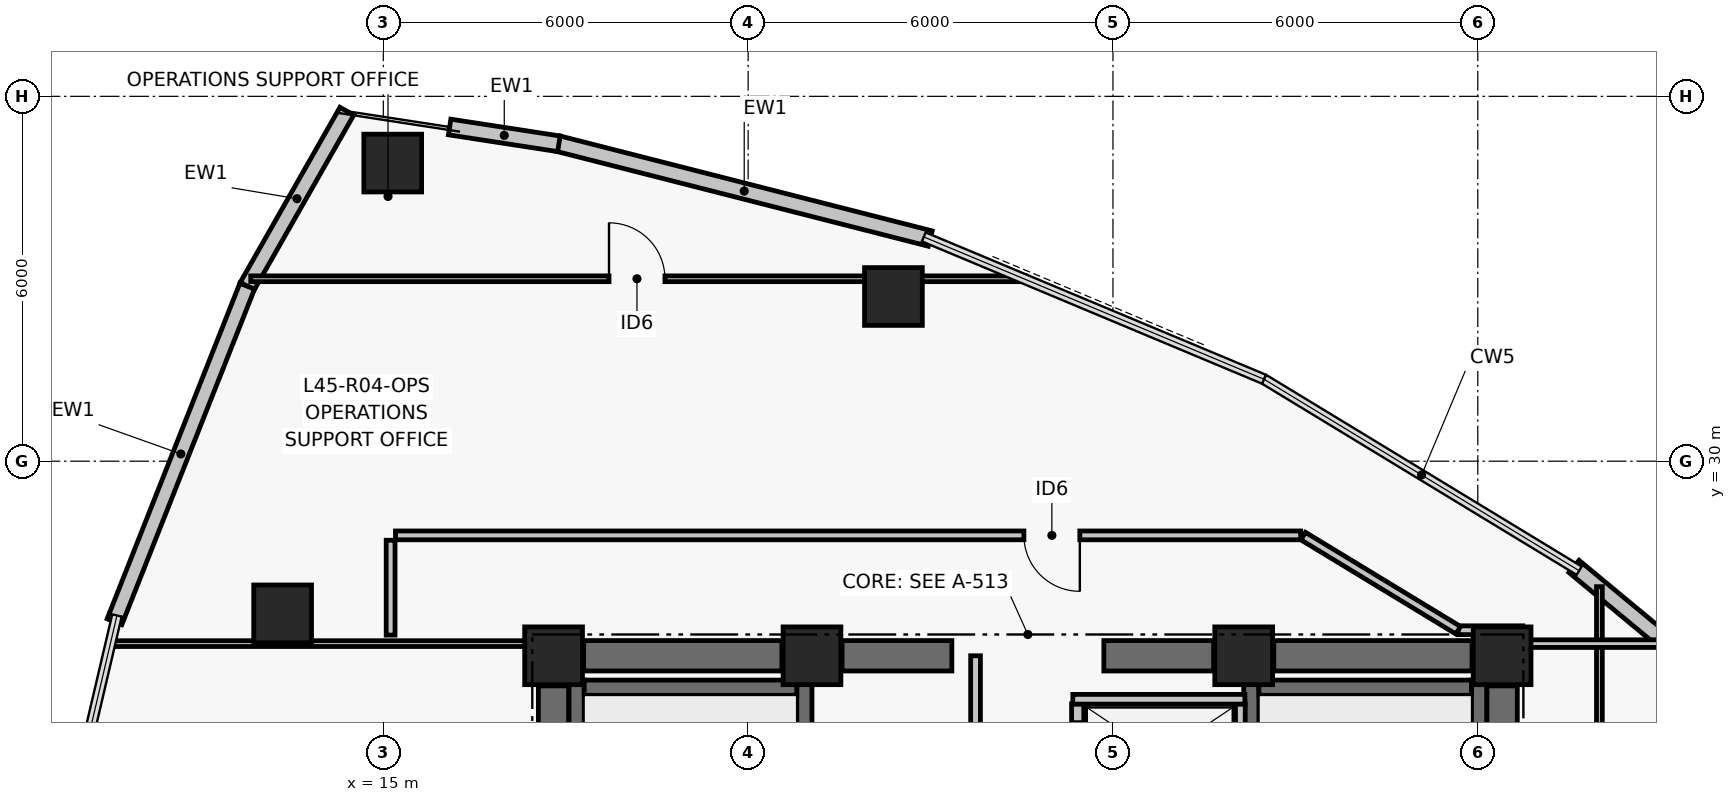
"""IFC4 building model, lengths in metres.
Left out: names, types, materials, properties, quantities, classifications, styles, units other than length and angle.
Written with IfcOpenShell. Run it as: python <this file> out.ifc"""

import sys

from ifc_helpers import new_model, si_unit, direction, frame, frame_2d, origin, origin_2d, place, context, subcontext, project, spatial, rectangle, hollow_rectangle, extrude, element, fill, save


model = new_model("IFC4")
c1 = context("Model", 3, precision=1e-05, world=origin(), true_north=direction((0.0, 1.0)))
c2 = subcontext(c1, "Body", "Model", "MODEL_VIEW")
j1 = project(units=[si_unit("LENGTHUNIT", "METRE"), si_unit("PLANEANGLEUNIT", "RADIAN")], contexts=[c1])
p1 = place(None, origin())
s1 = spatial("IfcSite", under=j1, at=p1, CompositionType="ELEMENT")
p2 = place(p1, origin())
s2 = spatial("IfcBuilding", under=s1, at=p2, CompositionType="ELEMENT")
p3 = place(p2, frame((0.0, 0.0, 180.36)))
s3 = spatial("IfcBuildingStorey", under=s2, at=p3, CompositionType="ELEMENT", Elevation=180.36)
for number, where, z_axis, x_axis in (
    (1, (17.8, 26.8, 0.0), (0.0, 0.0, 1.0), (1.0, 0.0, 0.0)),
    (2, (22.05, 26.8, 0.0), (0.0, 0.0, 1.0), (1.0, 0.0, 0.0)),
    (3, (29.15, 26.8, 0.0), (0.0, 0.0, 1.0), (1.0, 0.0, 0.0)),
    (4, (33.4, 26.8, 0.0), (0.0, 0.0, 1.0), (1.0, 0.0, 0.0)),
):
    element("IfcColumn", number, at=place(p3, frame(where, z_axis=z_axis, x_axis=x_axis)), inside=s3, PredefinedType="COLUMN", context=c2, shape_type="SweptSolid", body=[
        extrude(rectangle(XDim=0.95, YDim=0.95, at=origin_2d()), origin(), (0.0, 0.0, 1.0), 3.72),
    ])
p4 = place(p3, frame((18.295, 26.8, 0.0), z_axis=(0.0, 0.0, 1.0), x_axis=(1.0, 0.0, 0.0)))
e5 = element("IfcWall", 5, at=p4, inside=s3, PredefinedType="SHEAR", context=c2, shape_type="SweptSolid", body=[
    extrude(rectangle(XDim=3.26, YDim=0.5, at=frame_2d((1.63, 0.0))), origin(), (0.0, 0.0, 1.0), 3.5),
])
p5 = place(p3, frame((22.545, 26.8, 0.0), z_axis=(0.0, 0.0, 1.0), x_axis=(1.0, 0.0, 0.0)))
e6 = element("IfcWall", 6, at=p5, inside=s3, PredefinedType="SHEAR", context=c2, shape_type="SweptSolid", body=[
    extrude(rectangle(XDim=1.805, YDim=0.5, at=frame_2d((0.903, 0.0))), origin(), (0.0, 0.0, 1.0), 3.5),
])
p6 = place(p3, frame((26.85, 26.8, 0.0), z_axis=(0.0, 0.0, 1.0), x_axis=(1.0, 0.0, 0.0)))
e7 = element("IfcWall", 7, at=p6, inside=s3, PredefinedType="SHEAR", context=c2, shape_type="SweptSolid", body=[
    extrude(rectangle(XDim=1.805, YDim=0.5, at=frame_2d((0.902, 0.0))), origin(), (0.0, 0.0, 1.0), 3.5),
])
p7 = place(p3, frame((29.645, 26.8, 0.0), z_axis=(0.0, 0.0, 1.0), x_axis=(1.0, 0.0, 0.0)))
e8 = element("IfcWall", 8, at=p7, inside=s3, PredefinedType="SHEAR", context=c2, shape_type="SweptSolid", body=[
    extrude(rectangle(XDim=3.26, YDim=0.5, at=frame_2d((1.63, 0.0))), origin(), (0.0, 0.0, 1.0), 3.5),
])
for number, where, z_axis, x_axis in (
    (9, (17.8, 17.695, 0.0), (0.0, 0.0, 1.0), (0.0, 1.0, 0.0)),
    (10, (33.4, 17.695, 0.0), (0.0, 0.0, 1.0), (0.0, 1.0, 0.0)),
):
    element("IfcWall", number, at=place(p3, frame(where, z_axis=z_axis, x_axis=x_axis)), inside=s3, PredefinedType="SHEAR", context=c2, shape_type="SweptSolid", body=[
        extrude(rectangle(XDim=8.61, YDim=0.5, at=frame_2d((4.305, 0.0))), origin(), (0.0, 0.0, 1.0), 3.5),
    ])
p8 = place(p3, frame((18.179, 17.6, 0.0), z_axis=(0.0, 0.0, 1.0), x_axis=(0.0, 1.0, 0.0)))
e11 = element("IfcWall", 11, at=p8, inside=s3, PredefinedType="SHEAR", context=c2, shape_type="SweptSolid", body=[
    extrude(rectangle(XDim=8.8, YDim=0.25, at=frame_2d((4.4, 0.0))), origin(), (0.0, 0.0, 1.0), 3.5),
])
p9 = place(p3, frame((21.925, 17.6, 0.0), z_axis=(0.0, 0.0, 1.0), x_axis=(0.0, 1.0, 0.0)))
e12 = element("IfcWall", 12, at=p9, inside=s3, PredefinedType="SHEAR", context=c2, shape_type="SweptSolid", body=[
    extrude(rectangle(XDim=8.8, YDim=0.25, at=frame_2d((4.4, 0.0))), origin(), (0.0, 0.0, 1.0), 3.5),
])
p10 = place(p9, frame((0.35, 0.0, 0.0)))
e13 = element("IfcOpeningElement", 13, at=p10, cuts=e12, PredefinedType="OPENING", context=c2, shape_type="SweptSolid", body=[
    extrude(rectangle(XDim=1.05, YDim=2.08, at=frame_2d((0.525, 1.04))), frame((0.0, 0.135, 0.0), z_axis=(0.0, -1.0, 0.0), x_axis=(1.0, 0.0, 0.0)), (0.0, 0.0, 1.0), 0.27),
])
p11 = place(p3, frame((18.304, 26.275, 0.0), z_axis=(0.0, 0.0, 1.0), x_axis=(1.0, 0.0, 0.0)))
e14 = element("IfcWall", 14, at=p11, inside=s3, PredefinedType="SHEAR", context=c2, shape_type="SweptSolid", body=[
    extrude(rectangle(XDim=3.496, YDim=0.25, at=frame_2d((1.748, 0.0))), origin(), (0.0, 0.0, 1.0), 3.5),
])
p12 = place(p3, frame((29.275, 17.6, 0.0), z_axis=(0.0, 0.0, 1.0), x_axis=(0.0, 1.0, 0.0)))
e15 = element("IfcWall", 15, at=p12, inside=s3, PredefinedType="SHEAR", context=c2, shape_type="SweptSolid", body=[
    extrude(rectangle(XDim=8.8, YDim=0.25, at=frame_2d((4.4, 0.0))), origin(), (0.0, 0.0, 1.0), 3.5),
])
p13 = place(p12, frame((0.35, 0.0, 0.0)))
e16 = element("IfcOpeningElement", 16, at=p13, cuts=e15, PredefinedType="OPENING", context=c2, shape_type="SweptSolid", body=[
    extrude(rectangle(XDim=1.05, YDim=2.08, at=frame_2d((0.525, 1.04))), frame((0.0, 0.135, 0.0), z_axis=(0.0, -1.0, 0.0), x_axis=(1.0, 0.0, 0.0)), (0.0, 0.0, 1.0), 0.27),
])
p14 = place(p3, frame((33.021, 17.6, 0.0), z_axis=(0.0, 0.0, 1.0), x_axis=(0.0, 1.0, 0.0)))
e17 = element("IfcWall", 17, at=p14, inside=s3, PredefinedType="SHEAR", context=c2, shape_type="SweptSolid", body=[
    extrude(rectangle(XDim=8.8, YDim=0.25, at=frame_2d((4.4, 0.0))), origin(), (0.0, 0.0, 1.0), 3.5),
])
p15 = place(p3, frame((29.4, 26.275, 0.0), z_axis=(0.0, 0.0, 1.0), x_axis=(1.0, 0.0, 0.0)))
e18 = element("IfcWall", 18, at=p15, inside=s3, PredefinedType="SHEAR", context=c2, shape_type="SweptSolid", body=[
    extrude(rectangle(XDim=3.496, YDim=0.25, at=frame_2d((1.748, 0.0))), origin(), (0.0, 0.0, 1.0), 3.5),
])
for number, where, z_axis, x_axis in (
    (19, (23.389, 32.708, 0.0), (0.0, 0.0, 1.0), (1.0, 0.0, 0.0)),
    (20, (15.155, 34.903, 0.0), (0.0, 0.0, 1.0), (1.0, 0.0, 0.0)),
    (21, (13.344, 27.489, 0.0), (0.0, 0.0, 1.0), (1.0, 0.0, 0.0)),
):
    element("IfcColumn", number, at=place(p3, frame(where, z_axis=z_axis, x_axis=x_axis)), inside=s3, PredefinedType="COLUMN", context=c2, shape_type="SweptSolid", body=[
        extrude(hollow_rectangle(XDim=0.95, YDim=0.95, WallThickness=0.04, at=origin_2d()), origin(), (0.0, 0.0, 1.0), 3.72),
    ])
p16 = place(p3, frame((34.583, 28.27, 0.0), z_axis=(0.0, 0.0, 1.0), x_axis=(0.769770017655, -0.638321329676, 0.0)))
e22 = element("IfcWall", 22, at=p16, inside=s3, PredefinedType="PARTITIONING", context=c2, shape_type="SweptSolid", body=[
    extrude(rectangle(XDim=6.309, YDim=0.26, at=frame_2d((3.155, 0.0))), origin(), (0.0, 0.0, 1.0), 3.5),
])
p17 = place(p3, frame((17.876, 35.222, 0.0), z_axis=(0.0, 0.0, 1.0), x_axis=(0.968976240439, -0.247153890246, 0.0)))
e23 = element("IfcWall", 23, at=p17, inside=s3, PredefinedType="PARTITIONING", context=c2, shape_type="SweptSolid", body=[
    extrude(rectangle(XDim=6.315, YDim=0.26, at=frame_2d((3.157, 0.0))), origin(), (0.0, 0.0, 1.0), 3.5),
])
p18 = place(p3, frame((16.091, 35.496, 0.0), z_axis=(0.0, 0.0, 1.0), x_axis=(0.988377906791, -0.15201681936, 0.0)))
e24 = element("IfcWall", 24, at=p18, inside=s3, PredefinedType="PARTITIONING", context=c2, shape_type="SweptSolid", body=[
    extrude(rectangle(XDim=1.818, YDim=0.26, at=frame_2d((0.909, 0.0))), origin(), (0.0, 0.0, 1.0), 3.5),
])
p19 = place(p3, frame((12.761, 32.878, 0.0), z_axis=(0.0, 0.0, 1.0), x_axis=(0.494884228667, 0.86895891745, 0.0)))
e25 = element("IfcWall", 25, at=p19, inside=s3, PredefinedType="PARTITIONING", context=c2, shape_type="SweptSolid", body=[
    extrude(rectangle(XDim=3.312, YDim=0.26, at=frame_2d((1.656, 0.0))), origin(), (0.0, 0.0, 1.0), 3.5),
])
p20 = place(p3, frame((10.579, 27.36, 0.0), z_axis=(0.0, 0.0, 1.0), x_axis=(0.367819433119, 0.929897233365, 0.0)))
e26 = element("IfcWall", 26, at=p20, inside=s3, PredefinedType="PARTITIONING", context=c2, shape_type="SweptSolid", body=[
    extrude(rectangle(XDim=5.933, YDim=0.26, at=frame_2d((2.967, 0.0))), origin(), (0.0, 0.0, 1.0), 3.5),
])
p21 = place(p3, frame((26.42, 24.29, 0.0), z_axis=(0.0, 0.0, 1.0), x_axis=(0.0, 1.0, 0.0)))
e27 = element("IfcWall", 27, at=p21, inside=s3, PredefinedType="PARTITIONING", context=c2, shape_type="SweptSolid", body=[
    extrude(rectangle(XDim=1.72, YDim=0.2, at=frame_2d((0.86, 0.0))), origin(), (0.0, 0.0, 1.0), 3.5),
])
p22 = place(p21, frame((0.31, 0.0, 0.0)))
e28 = element("IfcOpeningElement", 28, at=p22, cuts=e27, PredefinedType="OPENING", context=c2, shape_type="SweptSolid", body=[
    extrude(rectangle(XDim=1.1, YDim=2.08, at=frame_2d((0.55, 1.04))), frame((0.0, 0.11, 0.0), z_axis=(0.0, -1.0, 0.0), x_axis=(1.0, 0.0, 0.0)), (0.0, 0.0, 1.0), 0.22),
])
p23 = place(p3, frame((29.095, 20.56, 0.0), z_axis=(0.0, 0.0, 1.0), x_axis=(0.0, 1.0, 0.0)))
e29 = element("IfcWall", 29, at=p23, inside=s3, PredefinedType="PARTITIONING", context=c2, shape_type="SweptSolid", body=[
    extrude(rectangle(XDim=5.45, YDim=0.16, at=frame_2d((2.725, 0.0))), origin(), (0.0, 0.0, 1.0), 3.5),
])
p24 = place(p3, frame((26.34, 26.085, 0.0), z_axis=(0.0, 0.0, 1.0), x_axis=(1.0, 0.0, 0.0)))
e30 = element("IfcWall", 30, at=p24, inside=s3, PredefinedType="PARTITIONING", context=c2, shape_type="SweptSolid", body=[
    extrude(rectangle(XDim=2.83, YDim=0.16, at=frame_2d((1.415, 0.0))), origin(), (0.0, 0.0, 1.0), 3.5),
])
p25 = place(p3, frame((24.74, 22.43, 0.0), z_axis=(0.0, 0.0, 1.0), x_axis=(0.0, 1.0, 0.0)))
e31 = element("IfcWall", 31, at=p25, inside=s3, PredefinedType="PARTITIONING", context=c2, shape_type="SweptSolid", body=[
    extrude(rectangle(XDim=4.37, YDim=0.16, at=frame_2d((2.185, 0.0))), origin(), (0.0, 0.0, 1.0), 2.63),
])
p26 = place(p25, frame((1.4, 0.0, 0.0)))
e32 = element("IfcOpeningElement", 32, at=p26, cuts=e31, PredefinedType="OPENING", context=c2, shape_type="SweptSolid", body=[
    extrude(rectangle(XDim=0.98, YDim=2.06, at=frame_2d((0.49, 1.03))), frame((0.0, 0.09, 0.0), z_axis=(0.0, -1.0, 0.0), x_axis=(1.0, 0.0, 0.0)), (0.0, 0.0, 1.0), 0.18),
])
p27 = place(p3, frame((33.74, 27.22, 0.0), z_axis=(0.0, 0.0, 1.0), x_axis=(-1.0, 0.0, 0.0)))
e33 = element("IfcWall", 33, at=p27, inside=s3, PredefinedType="PARTITIONING", context=c2, shape_type="SweptSolid", body=[
    extrude(rectangle(XDim=1.062, YDim=0.145, at=frame_2d((0.531, 0.0))), origin(), (0.0, 0.0, 1.0), 2.63),
])
p28 = place(p3, frame((32.677, 27.22, 0.0), z_axis=(0.0, 0.0, 1.0), x_axis=(-0.854662977584, 0.519183199601, 0.0)))
e34 = element("IfcWall", 34, at=p28, inside=s3, PredefinedType="PARTITIONING", context=c2, shape_type="SweptSolid", body=[
    extrude(rectangle(XDim=2.982, YDim=0.145, at=frame_2d((1.491, 0.0))), origin(), (0.0, 0.0, 1.0), 2.63),
])
p29 = place(p3, frame((30.087, 28.78, 0.0), z_axis=(0.0, 0.0, 1.0), x_axis=(-1.0, 0.0, 0.0)))
e35 = element("IfcWall", 35, at=p29, inside=s3, PredefinedType="PARTITIONING", context=c2, shape_type="SweptSolid", body=[
    extrude(rectangle(XDim=14.887, YDim=0.145, at=frame_2d((7.444, 0.0))), origin(), (0.0, 0.0, 1.0), 2.73),
])
p30 = place(p29, frame((3.632, 0.0, 0.0)))
e36 = element("IfcOpeningElement", 36, at=p30, cuts=e35, PredefinedType="OPENING", context=c2, shape_type="SweptSolid", body=[
    extrude(rectangle(XDim=0.92, YDim=2.05, at=frame_2d((0.46, 1.025))), frame((0.0, 0.083, 0.0), z_axis=(0.0, -1.0, 0.0), x_axis=(1.0, 0.0, 0.0)), (0.0, 0.0, 1.0), 0.165),
])
p31 = place(p3, frame((15.12, 28.7, 0.0), z_axis=(0.0, 0.0, 1.0), x_axis=(0.0, -1.0, 0.0)))
e37 = element("IfcWall", 37, at=p31, inside=s3, PredefinedType="PARTITIONING", context=c2, shape_type="SweptSolid", body=[
    extrude(rectangle(XDim=1.56, YDim=0.145, at=frame_2d((0.78, 0.0))), origin(), (0.0, 0.0, 1.0), 2.73),
])
p32 = place(p3, frame((35.0, 16.813, 0.0), z_axis=(0.0, 0.0, 1.0), x_axis=(0.0, 1.0, 0.0)))
e38 = element("IfcWall", 38, at=p32, inside=s3, PredefinedType="PARTITIONING", context=c2, shape_type="SweptSolid", body=[
    extrude(rectangle(XDim=11.123, YDim=0.095, at=frame_2d((5.562, 0.0))), origin(), (0.0, 0.0, 1.0), 2.73),
])
p33 = place(p32, frame((4.703, 0.0, 0.0)))
e39 = element("IfcOpeningElement", 39, at=p33, cuts=e38, PredefinedType="OPENING", context=c2, shape_type="SweptSolid", body=[
    extrude(rectangle(XDim=0.92, YDim=2.05, at=frame_2d((0.46, 1.025))), frame((0.0, 0.057, 0.0), z_axis=(0.0, -1.0, 0.0), x_axis=(1.0, 0.0, 0.0)), (0.0, 0.0, 1.0), 0.115),
])
p34 = place(p3, frame((10.501, 27.0, 0.0), z_axis=(0.0, 0.0, 1.0), x_axis=(1.0, 0.0, 0.0)))
e40 = element("IfcWall", 40, at=p34, inside=s3, PredefinedType="PARTITIONING", context=c2, shape_type="SweptSolid", body=[
    extrude(rectangle(XDim=6.929, YDim=0.095, at=frame_2d((3.465, 0.0))), origin(), (0.0, 0.0, 1.0), 2.73),
])
p35 = place(p3, frame((33.77, 27.0, 0.0), z_axis=(0.0, 0.0, 1.0), x_axis=(1.0, 0.0, 0.0)))
e41 = element("IfcWall", 41, at=p35, inside=s3, PredefinedType="PARTITIONING", context=c2, shape_type="SweptSolid", body=[
    extrude(rectangle(XDim=2.359, YDim=0.125, at=frame_2d((1.18, 0.0))), origin(), (0.0, 0.0, 1.0), 2.63),
])
p36 = place(p3, frame((12.819, 33.0, 0.0), z_axis=(0.0, 0.0, 1.0), x_axis=(1.0, 0.0, 0.0)))
e42 = element("IfcWall", 42, at=p36, inside=s3, PredefinedType="PARTITIONING", context=c2, shape_type="SweptSolid", body=[
    extrude(rectangle(XDim=12.741, YDim=0.095, at=frame_2d((6.371, 0.0))), origin(), (0.0, 0.0, 1.0), 2.73),
])
p37 = place(p36, frame((5.892, 0.0, 0.0)))
e43 = element("IfcOpeningElement", 43, at=p37, cuts=e42, PredefinedType="OPENING", context=c2, shape_type="SweptSolid", body=[
    extrude(rectangle(XDim=0.92, YDim=2.05, at=frame_2d((0.46, 1.025))), frame((0.0, 0.057, 0.0), z_axis=(0.0, -1.0, 0.0), x_axis=(1.0, 0.0, 0.0)), (0.0, 0.0, 1.0), 0.115),
])
p38 = place(p30, origin())
e44 = element("IfcDoor", 44, at=p38, inside=s3, OperationType="SINGLE_SWING_LEFT", PredefinedType="DOOR", context=c2, shape_type="SweptSolid", body=[
    extrude(rectangle(XDim=0.92, YDim=2.05, at=frame_2d((0.46, 1.025))), frame((0.0, 0.025, 0.0), z_axis=(0.0, -1.0, 0.0), x_axis=(1.0, 0.0, 0.0)), (0.0, 0.0, 1.0), 0.05),
])
fill(e36, e44)
p39 = place(p37, origin())
e45 = element("IfcDoor", 45, at=p39, inside=s3, OperationType="SINGLE_SWING_LEFT", PredefinedType="DOOR", context=c2, shape_type="SweptSolid", body=[
    extrude(rectangle(XDim=0.92, YDim=2.05, at=frame_2d((0.46, 1.025))), frame((0.0, 0.025, 0.0), z_axis=(0.0, -1.0, 0.0), x_axis=(1.0, 0.0, 0.0)), (0.0, 0.0, 1.0), 0.05),
])
fill(e43, e45)
save(model, sys.argv[1])
